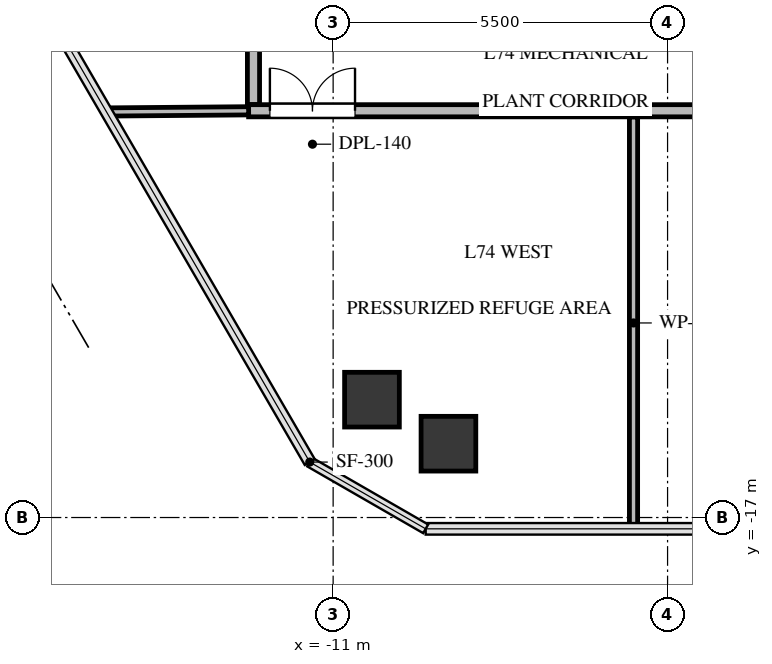
"""IFC4 building model, lengths in metres.
Left out: names, types, materials, properties, quantities, classifications, styles, units other than length and angle.
Written with IfcOpenShell. Run it as: python <this file> out.ifc"""

import sys

from ifc_helpers import new_model, si_unit, direction, frame, frame_2d, origin, origin_2d, place, context, subcontext, project, spatial, rectangle, extrude, source, transform, mapped, element, fill, save


model = new_model("IFC4")
c1 = context("Model", 3, precision=1e-05, world=origin(), true_north=direction((0.0, 1.0)))
c2 = subcontext(c1, "Body", "Model", "MODEL_VIEW")
j1 = project(units=[si_unit("LENGTHUNIT", "METRE"), si_unit("PLANEANGLEUNIT", "RADIAN")], contexts=[c1])
p1 = place(None, origin())
s1 = spatial("IfcSite", under=j1, at=p1, CompositionType="ELEMENT")
p2 = place(p1, origin())
s2 = spatial("IfcBuilding", under=s1, at=p2, CompositionType="ELEMENT")
p3 = place(p2, frame((0.0, 0.0, 264.9)))
s3 = spatial("IfcBuildingStorey", under=s2, at=p3, CompositionType="ELEMENT", Elevation=264.9)
m1 = source(origin(), c2, "Body", "SweptSolid", [
    extrude(rectangle(XDim=0.9, YDim=0.9, at=origin_2d()), origin(), (0.0, 0.0, 1.0), 3.4),
])
for number, where, z_axis, x_axis in (
    (1, (-10.361, -15.062, -0.3), (0.0, 0.0, 1.0), (1.0, 0.0, 0.0)),
    (2, (-9.104, -15.786, -0.3), (0.0, 0.0, 1.0), (1.0, 0.0, 0.0)),
):
    element("IfcColumn", number, at=place(p3, frame(where, z_axis=z_axis, x_axis=x_axis)), inside=s3, PredefinedType="COLUMN", context=c2, shape_type="MappedRepresentation", body=[
        mapped(m1, transform((0.0, 0.0, 0.0), x_axis=(1.0, 0.0, 0.0), y_axis=(0.0, 1.0, 0.0), z_axis=(0.0, 0.0, 1.0), scale=1.0)),
    ])
p4 = place(p3, frame((-12.39, -10.31, 0.0), z_axis=(0.0, 0.0, 1.0), x_axis=(1.0, 0.0, 0.0)))
e3 = element("IfcWall", 3, at=p4, inside=s3, PredefinedType="SOLIDWALL", context=c2, shape_type="SweptSolid", body=[
    extrude(rectangle(XDim=6.33, YDim=0.2, at=frame_2d((3.165, 0.0))), origin(), (0.0, 0.0, 1.0), 3.085),
])
p5 = place(p4, frame((0.35, 0.0, 0.0)))
e4 = element("IfcOpeningElement", 4, at=p5, cuts=e3, PredefinedType="OPENING", context=c2, shape_type="SweptSolid", body=[
    extrude(rectangle(XDim=1.4, YDim=2.15, at=frame_2d((0.7, 1.075))), frame((0.0, 0.11, 0.0), z_axis=(0.0, -1.0, 0.0), x_axis=(1.0, 0.0, 0.0)), (0.0, 0.0, 1.0), 0.22),
])
p6 = place(p3, frame((-6.06, -10.31, 0.0), z_axis=(0.0, 0.0, 1.0), x_axis=(1.0, 0.0, 0.0)))
e5 = element("IfcWall", 5, at=p6, inside=s3, PredefinedType="SOLIDWALL", context=c2, shape_type="SweptSolid", body=[
    extrude(rectangle(XDim=6.1, YDim=0.2, at=frame_2d((3.05, 0.0))), origin(), (0.0, 0.0, 1.0), 2.342),
])
p7 = place(p6, frame((2.35, 0.0, 0.0)))
e6 = element("IfcOpeningElement", 6, at=p7, cuts=e5, PredefinedType="OPENING", context=c2, shape_type="SweptSolid", body=[
    extrude(rectangle(XDim=1.4, YDim=2.15, at=frame_2d((0.7, 1.075))), frame((0.0, 0.11, 0.0), z_axis=(0.0, -1.0, 0.0), x_axis=(1.0, 0.0, 0.0)), (0.0, 0.0, 1.0), 0.22),
])
p8 = place(p3, frame((-12.31, -3.41, 0.0), z_axis=(0.0, 0.0, 1.0), x_axis=(0.0, -1.0, 0.0)))
e7 = element("IfcWall", 7, at=p8, inside=s3, PredefinedType="SOLIDWALL", context=c2, shape_type="SweptSolid", body=[
    extrude(rectangle(XDim=6.796, YDim=0.2, at=frame_2d((3.398, 0.0))), origin(), (0.0, 0.0, 1.0), 3.085),
])
p9 = place(p8, frame((2.948, 0.0, 0.0)))
e8 = element("IfcOpeningElement", 8, at=p9, cuts=e7, PredefinedType="OPENING", context=c2, shape_type="SweptSolid", body=[
    extrude(rectangle(XDim=0.9, YDim=2.05, at=frame_2d((0.45, 1.025))), frame((0.0, 0.11, 0.0), z_axis=(0.0, -1.0, 0.0), x_axis=(1.0, 0.0, 0.0)), (0.0, 0.0, 1.0), 0.22),
])
p10 = place(p3, frame((-6.06, -10.414, 0.0), z_axis=(0.0, 0.0, 1.0), x_axis=(0.0, -1.0, 0.0)))
e9 = element("IfcWall", 9, at=p10, inside=s3, PredefinedType="PARTITIONING", context=c2, shape_type="SweptSolid", body=[
    extrude(rectangle(XDim=6.772, YDim=0.135, at=frame_2d((3.386, 0.0))), origin(), (0.0, 0.0, 1.0), 2.342),
])
p11 = place(p3, frame((-14.726, -10.33, 0.0), z_axis=(0.0, 0.0, 1.0), x_axis=(0.99996592241, 0.008255544766, 0.0)))
e10 = element("IfcWall", 10, at=p11, inside=s3, PredefinedType="PARTITIONING", context=c2, shape_type="SweptSolid", body=[
    extrude(rectangle(XDim=2.336, YDim=0.135, at=frame_2d((1.168, 0.0))), origin(), (0.0, 0.0, 1.0), 2.439),
])
m2 = source(origin(), c2, "Body", "SweptSolid", [
    extrude(rectangle(XDim=1.4, YDim=2.15, at=frame_2d((0.7, 1.075))), frame((0.0, 0.025, 0.0), z_axis=(0.0, -1.0, 0.0), x_axis=(1.0, 0.0, 0.0)), (0.0, 0.0, 1.0), 0.05),
])
p12 = place(p5, origin())
e11 = element("IfcDoor", 11, at=p12, inside=s3, OperationType="DOUBLE_DOOR_SINGLE_SWING", PredefinedType="DOOR", context=c2, shape_type="MappedRepresentation", body=[
    mapped(m2, transform((0.0, 0.0, 0.0), x_axis=(1.0, 0.0, 0.0), y_axis=(0.0, 1.0, 0.0), z_axis=(0.0, 0.0, 1.0), scale=1.0)),
])
fill(e4, e11)
save(model, sys.argv[1])
